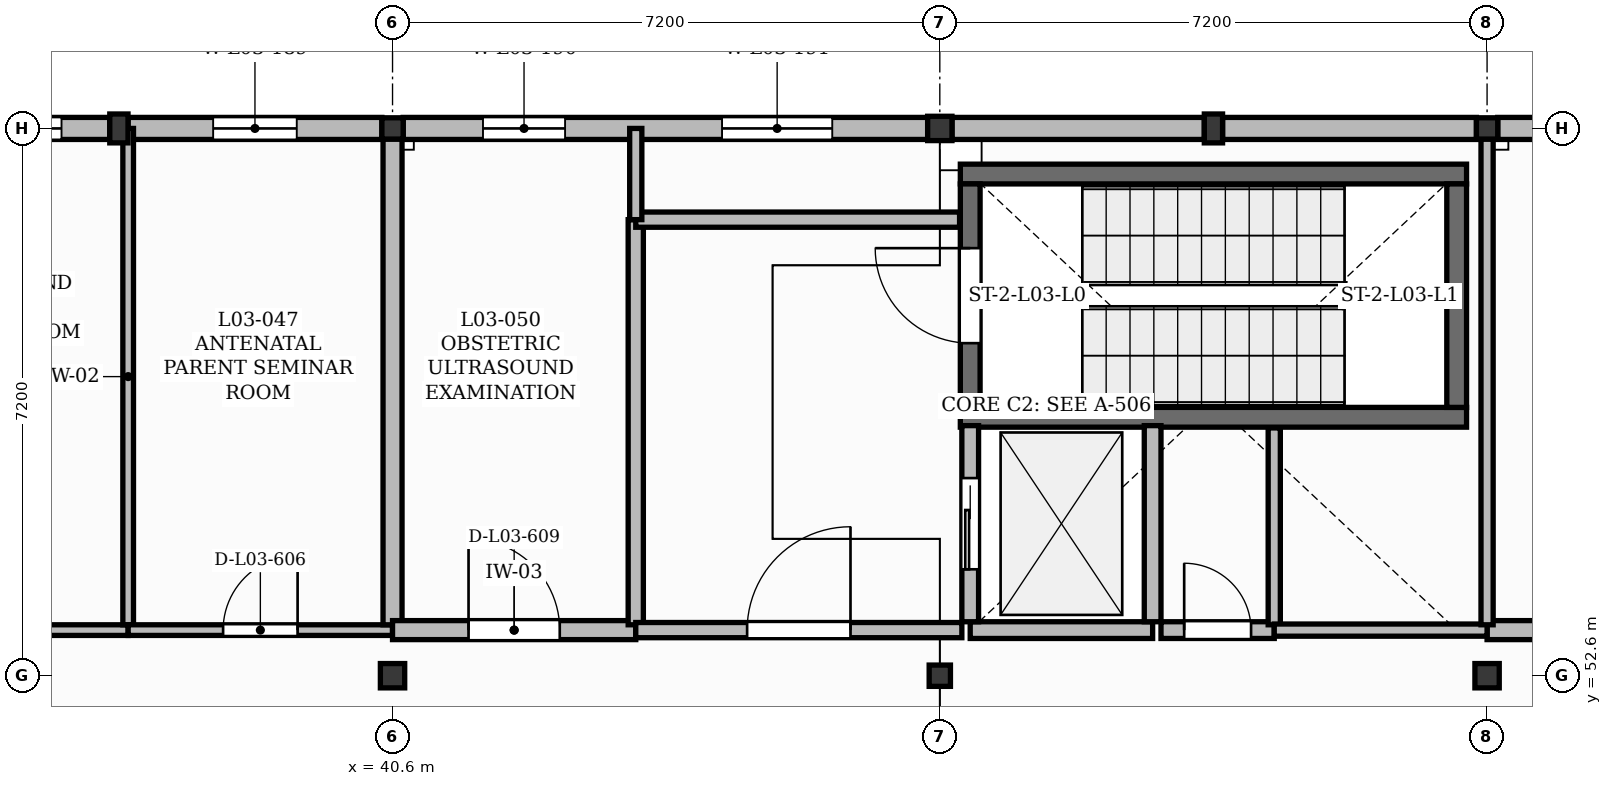
"""IFC4 building model, lengths in metres.
Left out: names, types, materials, properties, quantities, classifications, styles, units other than length and angle.
Written with IfcOpenShell. Run it as: python <this file> out.ifc"""

import sys

from ifc_helpers import new_model, si_unit, direction, frame, frame_2d, origin, origin_2d, place, context, subcontext, project, spatial, rectangle, extrude, element, fill, save


model = new_model("IFC4")
c1 = context("Model", 3, precision=1e-05, world=origin(), true_north=direction((0.0, 1.0)))
c2 = subcontext(c1, "Body", "Model", "MODEL_VIEW")
j1 = project(units=[si_unit("LENGTHUNIT", "METRE"), si_unit("PLANEANGLEUNIT", "RADIAN")], contexts=[c1])
p1 = place(None, origin())
s1 = spatial("IfcSite", under=j1, at=p1, CompositionType="ELEMENT")
p2 = place(p1, origin())
s2 = spatial("IfcBuilding", under=s1, at=p2, CompositionType="ELEMENT")
p3 = place(p2, frame((0.0, 0.0, 13.2)))
s3 = spatial("IfcBuildingStorey", under=s2, at=p3, CompositionType="ELEMENT", Elevation=13.2)
p4 = place(p3, frame((40.6, 52.6, 0.0), z_axis=(0.0, 0.0, 1.0), x_axis=(1.0, 0.0, 0.0)))
e1 = element("IfcColumn", 1, at=p4, inside=s3, PredefinedType="COLUMN", context=c2, shape_type="SweptSolid", body=[
    extrude(rectangle(XDim=0.32, YDim=0.32, at=origin_2d()), origin(), (0.0, 0.0, 1.0), 4.01),
])
for number, where, z_axis, x_axis in (
    (2, (40.6, 59.8, 0.0), (0.0, 0.0, 1.0), (1.0, 0.0, 0.0)),
    (3, (47.8, 52.6, 0.0), (0.0, 0.0, 1.0), (1.0, 0.0, 0.0)),
):
    element("IfcColumn", number, at=place(p3, frame(where, z_axis=z_axis, x_axis=x_axis)), inside=s3, PredefinedType="COLUMN", context=c2, shape_type="SweptSolid", body=[
        extrude(rectangle(XDim=0.28, YDim=0.28, at=origin_2d()), origin(), (0.0, 0.0, 1.0), 4.01),
    ])
p5 = place(p3, frame((47.8, 59.8, 0.0), z_axis=(0.0, 0.0, 1.0), x_axis=(1.0, 0.0, 0.0)))
e4 = element("IfcColumn", 4, at=p5, inside=s3, PredefinedType="COLUMN", context=c2, shape_type="SweptSolid", body=[
    extrude(rectangle(XDim=0.32, YDim=0.32, at=origin_2d()), origin(), (0.0, 0.0, 1.0), 4.01),
])
p6 = place(p3, frame((55.0, 52.6, 0.0), z_axis=(0.0, 0.0, 1.0), x_axis=(1.0, 0.0, 0.0)))
e5 = element("IfcColumn", 5, at=p6, inside=s3, PredefinedType="COLUMN", context=c2, shape_type="SweptSolid", body=[
    extrude(rectangle(XDim=0.32, YDim=0.32, at=origin_2d()), origin(), (0.0, 0.0, 1.0), 3.98),
])
p7 = place(p3, frame((55.0, 59.8, 0.0), z_axis=(0.0, 0.0, 1.0), x_axis=(1.0, 0.0, 0.0)))
e6 = element("IfcColumn", 6, at=p7, inside=s3, PredefinedType="COLUMN", context=c2, shape_type="SweptSolid", body=[
    extrude(rectangle(XDim=0.28, YDim=0.28, at=origin_2d()), origin(), (0.0, 0.0, 1.0), 3.98),
])
for number, where, z_axis, x_axis in (
    (7, (37.0, 59.8, 0.0), (0.0, 0.0, 1.0), (1.0, 0.0, 0.0)),
    (8, (51.4, 59.8, 0.0), (0.0, 0.0, 1.0), (1.0, 0.0, 0.0)),
):
    element("IfcColumn", number, at=place(p3, frame(where, z_axis=z_axis, x_axis=x_axis)), inside=s3, PredefinedType="PILASTER", context=c2, shape_type="SweptSolid", body=[
        extrude(rectangle(XDim=0.24, YDim=0.38, at=origin_2d()), origin(), (0.0, 0.0, 1.0), 4.01),
    ])
p8 = place(p3, frame((33.56, 59.8, 0.0), z_axis=(0.0, 0.0, 1.0), x_axis=(1.0, 0.0, 0.0)))
e9 = element("IfcWall", 9, at=p8, inside=s3, PredefinedType="SOLIDWALL", context=c2, shape_type="SweptSolid", body=[
    extrude(rectangle(XDim=3.32, YDim=0.29, at=frame_2d((1.66, 0.0))), origin(), (0.0, 0.0, 1.0), 3.55),
])
p9 = place(p8, frame((0.635, 0.0, 1.0)))
e10 = element("IfcOpeningElement", 10, at=p9, cuts=e9, PredefinedType="OPENING", context=c2, shape_type="SweptSolid", body=[
    extrude(rectangle(XDim=2.05, YDim=1.95, at=frame_2d((1.025, 0.975))), frame((0.0, 0.155, 0.0), z_axis=(0.0, -1.0, 0.0), x_axis=(1.0, 0.0, 0.0)), (0.0, 0.0, 1.0), 0.31),
])
p10 = place(p3, frame((37.12, 59.8, 0.0), z_axis=(0.0, 0.0, 1.0), x_axis=(1.0, 0.0, 0.0)))
e11 = element("IfcWall", 11, at=p10, inside=s3, PredefinedType="SOLIDWALL", context=c2, shape_type="SweptSolid", body=[
    extrude(rectangle(XDim=3.34, YDim=0.29, at=frame_2d((1.67, 0.0))), origin(), (0.0, 0.0, 1.0), 3.55),
])
p11 = place(p10, frame((1.12, 0.0, 1.0)))
e12 = element("IfcOpeningElement", 12, at=p11, cuts=e11, PredefinedType="OPENING", context=c2, shape_type="SweptSolid", body=[
    extrude(rectangle(XDim=1.1, YDim=1.8, at=frame_2d((0.55, 0.9))), frame((0.0, 0.155, 0.0), z_axis=(0.0, -1.0, 0.0), x_axis=(1.0, 0.0, 0.0)), (0.0, 0.0, 1.0), 0.31),
])
p12 = place(p3, frame((40.74, 59.8, 0.0), z_axis=(0.0, 0.0, 1.0), x_axis=(1.0, 0.0, 0.0)))
e13 = element("IfcWall", 13, at=p12, inside=s3, PredefinedType="SOLIDWALL", context=c2, shape_type="SweptSolid", body=[
    extrude(rectangle(XDim=6.9, YDim=0.29, at=frame_2d((3.45, 0.0))), origin(), (0.0, 0.0, 1.0), 3.55),
])
p13 = place(p12, frame((1.05, 0.0, 1.0)))
e14 = element("IfcOpeningElement", 14, at=p13, cuts=e13, PredefinedType="OPENING", context=c2, shape_type="SweptSolid", body=[
    extrude(rectangle(XDim=1.08, YDim=1.95, at=frame_2d((0.54, 0.975))), frame((0.0, 0.155, 0.0), z_axis=(0.0, -1.0, 0.0), x_axis=(1.0, 0.0, 0.0)), (0.0, 0.0, 1.0), 0.31),
])
p14 = place(p12, frame((4.195, 0.0, 1.35)))
e15 = element("IfcOpeningElement", 15, at=p14, cuts=e13, PredefinedType="OPENING", context=c2, shape_type="SweptSolid", body=[
    extrude(rectangle(XDim=1.45, YDim=1.4, at=frame_2d((0.725, 0.7))), frame((0.0, 0.155, 0.0), z_axis=(0.0, -1.0, 0.0), x_axis=(1.0, 0.0, 0.0)), (0.0, 0.0, 1.0), 0.31),
])
p15 = place(p3, frame((47.96, 59.8, 0.0), z_axis=(0.0, 0.0, 1.0), x_axis=(1.0, 0.0, 0.0)))
e16 = element("IfcWall", 16, at=p15, inside=s3, PredefinedType="SOLIDWALL", context=c2, shape_type="SweptSolid", body=[
    extrude(rectangle(XDim=3.32, YDim=0.29, at=frame_2d((1.66, 0.0))), origin(), (0.0, 0.0, 1.0), 3.52),
])
p16 = place(p3, frame((51.52, 59.8, 0.0), z_axis=(0.0, 0.0, 1.0), x_axis=(1.0, 0.0, 0.0)))
e17 = element("IfcWall", 17, at=p16, inside=s3, PredefinedType="SOLIDWALL", context=c2, shape_type="SweptSolid", body=[
    extrude(rectangle(XDim=3.34, YDim=0.29, at=frame_2d((1.67, 0.0))), origin(), (0.0, 0.0, 1.0), 3.52),
])
p17 = place(p3, frame((55.14, 59.8, 0.0), z_axis=(0.0, 0.0, 1.0), x_axis=(1.0, 0.0, 0.0)))
e18 = element("IfcWall", 18, at=p17, inside=s3, PredefinedType="SOLIDWALL", context=c2, shape_type="SweptSolid", body=[
    extrude(rectangle(XDim=3.34, YDim=0.29, at=frame_2d((1.67, 0.0))), origin(), (0.0, 0.0, 1.0), 3.52),
])
p18 = place(p17, frame((0.97, 0.0, 1.05)))
e19 = element("IfcOpeningElement", 19, at=p18, cuts=e18, PredefinedType="OPENING", context=c2, shape_type="SweptSolid", body=[
    extrude(rectangle(XDim=1.4, YDim=1.65, at=frame_2d((0.7, 0.825))), frame((0.0, 0.155, 0.0), z_axis=(0.0, -1.0, 0.0), x_axis=(1.0, 0.0, 0.0)), (0.0, 0.0, 1.0), 0.31),
])
for number, where, z_axis, x_axis in (
    (20, (48.07, 56.0, 0.0), (0.0, 0.0, 1.0), (1.0, 0.0, 0.0)),
    (21, (48.07, 59.2, 0.0), (0.0, 0.0, 1.0), (1.0, 0.0, 0.0)),
):
    element("IfcWall", number, at=place(p3, frame(where, z_axis=z_axis, x_axis=x_axis)), inside=s3, PredefinedType="SHEAR", context=c2, shape_type="SweptSolid", body=[
        extrude(rectangle(XDim=6.66, YDim=0.26, at=frame_2d((3.33, 0.0))), origin(), (0.0, 0.0, 1.0), 3.95),
    ])
p19 = place(p3, frame((48.2, 56.13, 0.0), z_axis=(0.0, 0.0, 1.0), x_axis=(0.0, 1.0, 0.0)))
e22 = element("IfcWall", 22, at=p19, inside=s3, PredefinedType="SHEAR", context=c2, shape_type="SweptSolid", body=[
    extrude(rectangle(XDim=2.94, YDim=0.26, at=frame_2d((1.47, 0.0))), origin(), (0.0, 0.0, 1.0), 3.95),
])
p20 = place(p19, frame((0.845, 0.0, 0.0)))
e23 = element("IfcOpeningElement", 23, at=p20, cuts=e22, PredefinedType="OPENING", context=c2, shape_type="SweptSolid", body=[
    extrude(rectangle(XDim=1.25, YDim=2.15, at=frame_2d((0.625, 1.075))), frame((0.0, 0.14, 0.0), z_axis=(0.0, -1.0, 0.0), x_axis=(1.0, 0.0, 0.0)), (0.0, 0.0, 1.0), 0.28),
])
p21 = place(p3, frame((54.6, 56.13, 0.0), z_axis=(0.0, 0.0, 1.0), x_axis=(0.0, 1.0, 0.0)))
e24 = element("IfcWall", 24, at=p21, inside=s3, PredefinedType="SHEAR", context=c2, shape_type="SweptSolid", body=[
    extrude(rectangle(XDim=2.94, YDim=0.26, at=frame_2d((1.47, 0.0))), origin(), (0.0, 0.0, 1.0), 3.95),
])
p22 = place(p3, frame((48.2, 53.2, 0.0), z_axis=(0.0, 0.0, 1.0), x_axis=(1.0, 0.0, 0.0)))
e25 = element("IfcWall", 25, at=p22, inside=s3, PredefinedType="SOLIDWALL", context=c2, shape_type="SweptSolid", body=[
    extrude(rectangle(XDim=2.4, YDim=0.22, at=frame_2d((1.2, 0.0))), origin(), (0.0, 0.0, 1.0), 3.95),
])
p23 = place(p3, frame((48.2, 53.31, 0.0), z_axis=(0.0, 0.0, 1.0), x_axis=(0.0, 1.0, 0.0)))
e26 = element("IfcWall", 26, at=p23, inside=s3, PredefinedType="SOLIDWALL", context=c2, shape_type="SweptSolid", body=[
    extrude(rectangle(XDim=2.58, YDim=0.22, at=frame_2d((1.29, 0.0))), origin(), (0.0, 0.0, 1.0), 3.95),
])
p24 = place(p23, frame((0.69, 0.0, 0.0)))
e27 = element("IfcOpeningElement", 27, at=p24, cuts=e26, PredefinedType="OPENING", context=c2, shape_type="SweptSolid", body=[
    extrude(rectangle(XDim=1.2, YDim=2.15, at=frame_2d((0.6, 1.075))), frame((0.0, 0.12, 0.0), z_axis=(0.0, -1.0, 0.0), x_axis=(1.0, 0.0, 0.0)), (0.0, 0.0, 1.0), 0.24),
])
p25 = place(p3, frame((50.6, 53.31, 0.0), z_axis=(0.0, 0.0, 1.0), x_axis=(0.0, 1.0, 0.0)))
e28 = element("IfcWall", 28, at=p25, inside=s3, PredefinedType="SOLIDWALL", context=c2, shape_type="SweptSolid", body=[
    extrude(rectangle(XDim=2.58, YDim=0.22, at=frame_2d((1.29, 0.0))), origin(), (0.0, 0.0, 1.0), 3.95),
])
p26 = place(p3, frame((33.4, 53.2, 0.0), z_axis=(0.0, 0.0, 1.0), x_axis=(1.0, 0.0, 0.0)))
e29 = element("IfcWall", 29, at=p26, inside=s3, PredefinedType="PARTITIONING", context=c2, shape_type="SweptSolid", body=[
    extrude(rectangle(XDim=3.722, YDim=0.14, at=frame_2d((1.861, 0.0))), origin(), (0.0, 0.0, 1.0), 3.96),
])
p27 = place(p26, frame((1.221, 0.0, 0.0)))
e30 = element("IfcOpeningElement", 30, at=p27, cuts=e29, PredefinedType="OPENING", context=c2, shape_type="SweptSolid", body=[
    extrude(rectangle(XDim=1.28, YDim=2.2, at=frame_2d((0.64, 1.1))), frame((0.0, 0.08, 0.0), z_axis=(0.0, -1.0, 0.0), x_axis=(1.0, 0.0, 0.0)), (0.0, 0.0, 1.0), 0.16),
])
p28 = place(p3, frame((37.122, 53.27, 0.0), z_axis=(0.0, 0.0, 1.0), x_axis=(0.0, 1.0, 0.0)))
e31 = element("IfcWall", 31, at=p28, inside=s3, PredefinedType="PARTITIONING", context=c2, shape_type="SweptSolid", body=[
    extrude(rectangle(XDim=6.53, YDim=0.14, at=frame_2d((3.265, 0.0))), origin(), (0.0, 0.0, 1.0), 3.96),
])
p29 = place(p3, frame((37.122, 53.2, 0.0), z_axis=(0.0, 0.0, 1.0), x_axis=(1.0, 0.0, 0.0)))
e32 = element("IfcWall", 32, at=p29, inside=s3, PredefinedType="PARTITIONING", context=c2, shape_type="SweptSolid", body=[
    extrude(rectangle(XDim=3.478, YDim=0.14, at=frame_2d((1.739, 0.0))), origin(), (0.0, 0.0, 1.0), 3.96),
])
p30 = place(p29, frame((1.249, 0.0, 0.0)))
e33 = element("IfcOpeningElement", 33, at=p30, cuts=e32, PredefinedType="OPENING", context=c2, shape_type="SweptSolid", body=[
    extrude(rectangle(XDim=0.98, YDim=2.15, at=frame_2d((0.49, 1.075))), frame((0.0, 0.08, 0.0), z_axis=(0.0, -1.0, 0.0), x_axis=(1.0, 0.0, 0.0)), (0.0, 0.0, 1.0), 0.16),
])
p31 = place(p3, frame((40.6, 53.27, 0.0), z_axis=(0.0, 0.0, 1.0), x_axis=(0.0, 1.0, 0.0)))
e34 = element("IfcWall", 34, at=p31, inside=s3, PredefinedType="SOLIDWALL", context=c2, shape_type="SweptSolid", body=[
    extrude(rectangle(XDim=6.39, YDim=0.25, at=frame_2d((3.195, 0.0))), origin(), (0.0, 0.0, 1.0), 3.49),
])
p32 = place(p3, frame((40.6, 53.2, 0.0), z_axis=(0.0, 0.0, 1.0), x_axis=(1.0, 0.0, 0.0)))
e35 = element("IfcWall", 35, at=p32, inside=s3, PredefinedType="SOLIDWALL", context=c2, shape_type="SweptSolid", body=[
    extrude(rectangle(XDim=3.2, YDim=0.25, at=frame_2d((1.6, 0.0))), origin(), (0.0, 0.0, 1.0), 3.96),
])
p33 = place(p32, frame((1.0, 0.0, 0.0)))
e36 = element("IfcOpeningElement", 36, at=p33, cuts=e35, PredefinedType="OPENING", context=c2, shape_type="SweptSolid", body=[
    extrude(rectangle(XDim=1.2, YDim=2.15, at=frame_2d((0.6, 1.075))), frame((0.0, 0.135, 0.0), z_axis=(0.0, -1.0, 0.0), x_axis=(1.0, 0.0, 0.0)), (0.0, 0.0, 1.0), 0.27),
])
p34 = place(p3, frame((43.8, 53.27, 0.0), z_axis=(0.0, 0.0, 1.0), x_axis=(0.0, 1.0, 0.0)))
e37 = element("IfcWall", 37, at=p34, inside=s3, PredefinedType="PARTITIONING", context=c2, shape_type="SweptSolid", body=[
    extrude(rectangle(XDim=5.33, YDim=0.2, at=frame_2d((2.665, 0.0))), origin(), (0.0, 0.0, 1.0), 3.96),
])
p35 = place(p3, frame((43.8, 53.2, 0.0), z_axis=(0.0, 0.0, 1.0), x_axis=(1.0, 0.0, 0.0)))
e38 = element("IfcWall", 38, at=p35, inside=s3, PredefinedType="PARTITIONING", context=c2, shape_type="SweptSolid", body=[
    extrude(rectangle(XDim=4.29, YDim=0.2, at=frame_2d((2.145, 0.0))), origin(), (0.0, 0.0, 1.0), 3.96),
])
p36 = place(p35, frame((1.465, 0.0, 0.0)))
e39 = element("IfcOpeningElement", 39, at=p36, cuts=e38, PredefinedType="OPENING", context=c2, shape_type="SweptSolid", body=[
    extrude(rectangle(XDim=1.36, YDim=2.2, at=frame_2d((0.68, 1.1))), frame((0.0, 0.11, 0.0), z_axis=(0.0, -1.0, 0.0), x_axis=(1.0, 0.0, 0.0)), (0.0, 0.0, 1.0), 0.22),
])
p37 = place(p3, frame((50.71, 53.2, 0.0), z_axis=(0.0, 0.0, 1.0), x_axis=(1.0, 0.0, 0.0)))
e40 = element("IfcWall", 40, at=p37, inside=s3, PredefinedType="SOLIDWALL", context=c2, shape_type="SweptSolid", body=[
    extrude(rectangle(XDim=1.49, YDim=0.22, at=frame_2d((0.745, 0.0))), origin(), (0.0, 0.0, 1.0), 3.96),
])
p38 = place(p37, frame((0.305, 0.0, 0.0)))
e41 = element("IfcOpeningElement", 41, at=p38, cuts=e40, PredefinedType="OPENING", context=c2, shape_type="SweptSolid", body=[
    extrude(rectangle(XDim=0.88, YDim=2.05, at=frame_2d((0.44, 1.025))), frame((0.0, 0.12, 0.0), z_axis=(0.0, -1.0, 0.0), x_axis=(1.0, 0.0, 0.0)), (0.0, 0.0, 1.0), 0.24),
])
p39 = place(p3, frame((55.0, 53.2, 0.0), z_axis=(0.0, 0.0, 1.0), x_axis=(1.0, 0.0, 0.0)))
e42 = element("IfcWall", 42, at=p39, inside=s3, PredefinedType="SOLIDWALL", context=c2, shape_type="SweptSolid", body=[
    extrude(rectangle(XDim=7.2, YDim=0.25, at=frame_2d((3.6, 0.0))), origin(), (0.0, 0.0, 1.0), 3.96),
])
p40 = place(p39, frame((3.12, 0.0, 0.0)))
e43 = element("IfcOpeningElement", 43, at=p40, cuts=e42, PredefinedType="OPENING", context=c2, shape_type="SweptSolid", body=[
    extrude(rectangle(XDim=0.96, YDim=2.1, at=frame_2d((0.48, 1.05))), frame((0.0, 0.135, 0.0), z_axis=(0.0, -1.0, 0.0), x_axis=(1.0, 0.0, 0.0)), (0.0, 0.0, 1.0), 0.27),
])
p41 = place(p39, frame((4.48, 0.0, 1.05)))
e44 = element("IfcOpeningElement", 44, at=p41, cuts=e42, PredefinedType="OPENING", context=c2, shape_type="SweptSolid", body=[
    extrude(rectangle(XDim=1.6, YDim=1.1, at=frame_2d((0.8, 0.55))), frame((0.0, 0.135, 0.0), z_axis=(0.0, -1.0, 0.0), x_axis=(1.0, 0.0, 0.0)), (0.0, 0.0, 1.0), 0.27),
])
p42 = place(p3, frame((52.2, 53.27, 0.0), z_axis=(0.0, 0.0, 1.0), x_axis=(0.0, 1.0, 0.0)))
e45 = element("IfcWall", 45, at=p42, inside=s3, PredefinedType="PARTITIONING", context=c2, shape_type="SweptSolid", body=[
    extrude(rectangle(XDim=2.59, YDim=0.16, at=frame_2d((1.295, 0.0))), origin(), (0.0, 0.0, 1.0), 3.96),
])
p43 = place(p3, frame((48.06, 58.6, 0.0), z_axis=(0.0, 0.0, 1.0), x_axis=(-1.0, 0.0, 0.0)))
e46 = element("IfcWall", 46, at=p43, inside=s3, PredefinedType="PARTITIONING", context=c2, shape_type="SweptSolid", body=[
    extrude(rectangle(XDim=4.26, YDim=0.2, at=frame_2d((2.13, 0.0))), origin(), (0.0, 0.0, 1.0), 3.96),
])
p44 = place(p3, frame((55.0, 53.2, 0.0), z_axis=(0.0, 0.0, 1.0), x_axis=(-1.0, 0.0, 0.0)))
e47 = element("IfcWall", 47, at=p44, inside=s3, PredefinedType="PARTITIONING", context=c2, shape_type="SweptSolid", body=[
    extrude(rectangle(XDim=2.8, YDim=0.16, at=frame_2d((1.4, 0.0))), origin(), (0.0, 0.0, 1.0), 3.96),
])
p45 = place(p3, frame((43.8, 58.6, 0.0), z_axis=(0.0, 0.0, 1.0), x_axis=(0.0, 1.0, 0.0)))
e48 = element("IfcWall", 48, at=p45, inside=s3, PredefinedType="PARTITIONING", context=c2, shape_type="SweptSolid", body=[
    extrude(rectangle(XDim=1.2, YDim=0.16, at=frame_2d((0.6, 0.0))), origin(), (0.0, 0.0, 1.0), 3.96),
])
p46 = place(p3, frame((55.0, 53.27, 0.0), z_axis=(0.0, 0.0, 1.0), x_axis=(0.0, 1.0, 0.0)))
e49 = element("IfcWall", 49, at=p46, inside=s3, PredefinedType="PARTITIONING", context=c2, shape_type="SweptSolid", body=[
    extrude(rectangle(XDim=6.39, YDim=0.16, at=frame_2d((3.195, 0.0))), origin(), (0.0, 0.0, 1.0), 3.52),
])
p47 = place(p9, origin())
e50 = element("IfcWindow", 50, at=p47, inside=s3, PartitioningType="DOUBLE_PANEL_VERTICAL", PredefinedType="WINDOW", context=c2, shape_type="SweptSolid", body=[
    extrude(rectangle(XDim=2.05, YDim=1.95, at=frame_2d((1.025, 0.975))), frame((0.0, 0.03, 0.0), z_axis=(0.0, -1.0, 0.0), x_axis=(1.0, 0.0, 0.0)), (0.0, 0.0, 1.0), 0.06),
])
fill(e10, e50)
p48 = place(p11, origin())
e51 = element("IfcWindow", 51, at=p48, inside=s3, PartitioningType="SINGLE_PANEL", PredefinedType="WINDOW", context=c2, shape_type="SweptSolid", body=[
    extrude(rectangle(XDim=1.1, YDim=1.8, at=frame_2d((0.55, 0.9))), frame((0.0, 0.03, 0.0), z_axis=(0.0, -1.0, 0.0), x_axis=(1.0, 0.0, 0.0)), (0.0, 0.0, 1.0), 0.06),
])
fill(e12, e51)
p49 = place(p13, origin())
e52 = element("IfcWindow", 52, at=p49, inside=s3, PartitioningType="SINGLE_PANEL", PredefinedType="WINDOW", context=c2, shape_type="SweptSolid", body=[
    extrude(rectangle(XDim=1.08, YDim=1.95, at=frame_2d((0.54, 0.975))), frame((0.0, 0.03, 0.0), z_axis=(0.0, -1.0, 0.0), x_axis=(1.0, 0.0, 0.0)), (0.0, 0.0, 1.0), 0.06),
])
fill(e14, e52)
p50 = place(p14, origin())
e53 = element("IfcWindow", 53, at=p50, inside=s3, PartitioningType="SINGLE_PANEL", PredefinedType="WINDOW", context=c2, shape_type="SweptSolid", body=[
    extrude(rectangle(XDim=1.45, YDim=1.4, at=frame_2d((0.725, 0.7))), frame((0.0, 0.03, 0.0), z_axis=(0.0, -1.0, 0.0), x_axis=(1.0, 0.0, 0.0)), (0.0, 0.0, 1.0), 0.06),
])
fill(e15, e53)
p51 = place(p24, origin())
e54 = element("IfcDoor", 54, at=p51, inside=s3, OperationType="SLIDING_TO_LEFT", PredefinedType="DOOR", context=c2, shape_type="SweptSolid", body=[
    extrude(rectangle(XDim=1.2, YDim=2.15, at=frame_2d((0.6, 1.075))), frame((0.0, 0.025, 0.0), z_axis=(0.0, -1.0, 0.0), x_axis=(1.0, 0.0, 0.0)), (0.0, 0.0, 1.0), 0.05),
])
fill(e27, e54)
p52 = place(p20, origin())
e55 = element("IfcDoor", 55, at=p52, inside=s3, OperationType="SINGLE_SWING_RIGHT", PredefinedType="DOOR", context=c2, shape_type="SweptSolid", body=[
    extrude(rectangle(XDim=1.25, YDim=2.15, at=frame_2d((0.625, 1.075))), frame((0.0, 0.025, 0.0), z_axis=(0.0, -1.0, 0.0), x_axis=(1.0, 0.0, 0.0)), (0.0, 0.0, 1.0), 0.05),
])
fill(e23, e55)
p53 = place(p36, origin())
e56 = element("IfcDoor", 56, at=p53, inside=s3, OperationType="SINGLE_SWING_RIGHT", PredefinedType="DOOR", context=c2, shape_type="SweptSolid", body=[
    extrude(rectangle(XDim=1.36, YDim=2.2, at=frame_2d((0.68, 1.1))), frame((0.0, 0.025, 0.0), z_axis=(0.0, -1.0, 0.0), x_axis=(1.0, 0.0, 0.0)), (0.0, 0.0, 1.0), 0.05),
])
fill(e39, e56)
p54 = place(p38, origin())
e57 = element("IfcDoor", 57, at=p54, inside=s3, OperationType="SINGLE_SWING_LEFT", PredefinedType="DOOR", context=c2, shape_type="SweptSolid", body=[
    extrude(rectangle(XDim=0.88, YDim=2.05, at=frame_2d((0.44, 1.025))), frame((0.0, 0.025, 0.0), z_axis=(0.0, -1.0, 0.0), x_axis=(1.0, 0.0, 0.0)), (0.0, 0.0, 1.0), 0.05),
])
fill(e41, e57)
p55 = place(p30, origin())
e58 = element("IfcDoor", 58, at=p55, inside=s3, OperationType="SINGLE_SWING_RIGHT", PredefinedType="DOOR", context=c2, shape_type="SweptSolid", body=[
    extrude(rectangle(XDim=0.98, YDim=2.15, at=frame_2d((0.49, 1.075))), frame((0.0, 0.025, 0.0), z_axis=(0.0, -1.0, 0.0), x_axis=(1.0, 0.0, 0.0)), (0.0, 0.0, 1.0), 0.05),
])
fill(e33, e58)
p56 = place(p33, origin())
e59 = element("IfcDoor", 59, at=p56, inside=s3, OperationType="SINGLE_SWING_LEFT", PredefinedType="DOOR", context=c2, shape_type="SweptSolid", body=[
    extrude(rectangle(XDim=1.2, YDim=2.15, at=frame_2d((0.6, 1.075))), frame((0.0, 0.025, 0.0), z_axis=(0.0, -1.0, 0.0), x_axis=(1.0, 0.0, 0.0)), (0.0, 0.0, 1.0), 0.05),
])
fill(e36, e59)
save(model, sys.argv[1])
